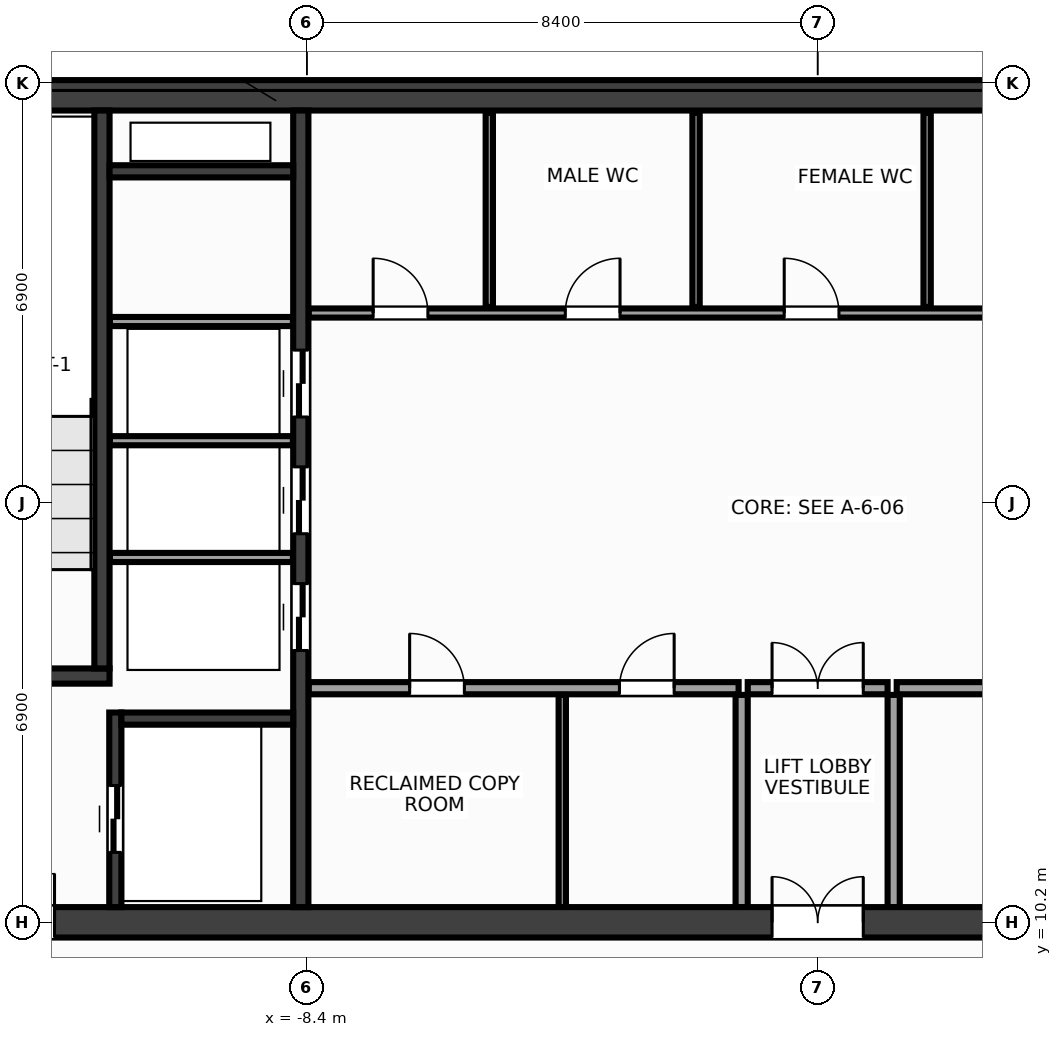
"""IFC4 building model, lengths in metres.
Left out: names, types, materials, properties, quantities, classifications, styles, units other than length and angle.
Written with IfcOpenShell. Run it as: python <this file> out.ifc"""

import sys

from ifc_helpers import new_model, si_unit, direction, frame, frame_2d, origin, place, context, subcontext, project, spatial, rectangle, extrude, source, transform, mapped, element, fill, save


model = new_model("IFC4")
c1 = context("Model", 3, precision=1e-05, world=origin(), true_north=direction((0.0, 1.0)))
c2 = subcontext(c1, "Body", "Model", "MODEL_VIEW")
j1 = project(units=[si_unit("LENGTHUNIT", "METRE"), si_unit("PLANEANGLEUNIT", "RADIAN")], contexts=[c1])
p1 = place(None, origin())
s1 = spatial("IfcSite", under=j1, at=p1, CompositionType="ELEMENT")
p2 = place(p1, origin())
s2 = spatial("IfcBuilding", under=s1, at=p2, CompositionType="ELEMENT")
p3 = place(p2, frame((0.0, 0.0, 207.2)))
s3 = spatial("IfcBuildingStorey", under=s2, at=p3, CompositionType="ELEMENT", Elevation=207.2)
m1 = source(origin(), c2, "Body", "SweptSolid", [
    extrude(rectangle(XDim=31.7, YDim=0.5, at=frame_2d((15.85, 0.0))), origin(), (0.0, 0.0, 1.0), 3.6),
])
p4 = place(p3, frame((-15.85, 23.8, 0.0), z_axis=(0.0, 0.0, 1.0), x_axis=(1.0, 0.0, 0.0)))
e1 = element("IfcWall", 1, at=p4, inside=s3, PredefinedType="SHEAR", context=c2, shape_type="MappedRepresentation", body=[
    mapped(m1, transform((0.0, 0.0, 0.0), x_axis=(1.0, 0.0, 0.0), y_axis=(0.0, 1.0, 0.0), z_axis=(0.0, 0.0, 1.0), scale=1.0)),
])
p5 = place(p3, frame((-15.85, 10.2, 0.0), z_axis=(0.0, 0.0, 1.0), x_axis=(1.0, 0.0, 0.0)))
e2 = element("IfcWall", 2, at=p5, inside=s3, PredefinedType="SHEAR", context=c2, shape_type="MappedRepresentation", body=[
    mapped(m1, transform((0.0, 0.0, 0.0), x_axis=(1.0, 0.0, 0.0), y_axis=(0.0, 1.0, 0.0), z_axis=(0.0, 0.0, 1.0), scale=1.0)),
])
p6 = place(p5, frame((1.7, 0.0, 0.0)))
e3 = element("IfcOpeningElement", 3, at=p6, cuts=e2, PredefinedType="OPENING", context=c2, shape_type="SweptSolid", body=[
    extrude(rectangle(XDim=1.6, YDim=2.15, at=frame_2d((0.8, 1.075))), frame((0.0, 0.262, 0.0), z_axis=(0.0, -1.0, 0.0), x_axis=(1.0, 0.0, 0.0)), (0.0, 0.0, 1.0), 0.524),
])
p7 = place(p5, frame((28.4, 0.0, 0.0)))
e4 = element("IfcOpeningElement", 4, at=p7, cuts=e2, PredefinedType="OPENING", context=c2, shape_type="SweptSolid", body=[
    extrude(rectangle(XDim=1.6, YDim=2.15, at=frame_2d((0.8, 1.075))), frame((0.0, 0.262, 0.0), z_axis=(0.0, -1.0, 0.0), x_axis=(1.0, 0.0, 0.0)), (0.0, 0.0, 1.0), 0.524),
])
p8 = place(p5, frame((15.1, 0.0, 0.0)))
e5 = element("IfcOpeningElement", 5, at=p8, cuts=e2, PredefinedType="OPENING", context=c2, shape_type="SweptSolid", body=[
    extrude(rectangle(XDim=1.5, YDim=2.2, at=frame_2d((0.75, 1.1))), frame((0.0, 0.262, 0.0), z_axis=(0.0, -1.0, 0.0), x_axis=(1.0, 0.0, 0.0)), (0.0, 0.0, 1.0), 0.524),
])
m2 = source(origin(), c2, "Body", "SweptSolid", [
    extrude(rectangle(XDim=13.1, YDim=0.25, at=frame_2d((6.55, 0.0))), origin(), (0.0, 0.0, 1.0), 3.6),
])
p9 = place(p3, frame((-8.5, 10.45, 0.0), z_axis=(0.0, 0.0, 1.0), x_axis=(0.0, 1.0, 0.0)))
e6 = element("IfcWall", 6, at=p9, inside=s3, PredefinedType="SHEAR", context=c2, shape_type="MappedRepresentation", body=[
    mapped(m2, transform((0.0, 0.0, 0.0), x_axis=(1.0, 0.0, 0.0), y_axis=(0.0, 1.0, 0.0), z_axis=(0.0, 0.0, 1.0), scale=1.0)),
])
p10 = place(p9, frame((4.22, 0.0, 0.0)))
e7 = element("IfcOpeningElement", 7, at=p10, cuts=e6, PredefinedType="OPENING", context=c2, shape_type="SweptSolid", body=[
    extrude(rectangle(XDim=1.1, YDim=2.15, at=frame_2d((0.55, 1.075))), frame((0.0, 0.137, 0.0), z_axis=(0.0, -1.0, 0.0), x_axis=(1.0, 0.0, 0.0)), (0.0, 0.0, 1.0), 0.274),
])
p11 = place(p9, frame((6.14, 0.0, 0.0)))
e8 = element("IfcOpeningElement", 8, at=p11, cuts=e6, PredefinedType="OPENING", context=c2, shape_type="SweptSolid", body=[
    extrude(rectangle(XDim=1.1, YDim=2.15, at=frame_2d((0.55, 1.075))), frame((0.0, 0.137, 0.0), z_axis=(0.0, -1.0, 0.0), x_axis=(1.0, 0.0, 0.0)), (0.0, 0.0, 1.0), 0.274),
])
p12 = place(p9, frame((8.06, 0.0, 0.0)))
e9 = element("IfcOpeningElement", 9, at=p12, cuts=e6, PredefinedType="OPENING", context=c2, shape_type="SweptSolid", body=[
    extrude(rectangle(XDim=1.1, YDim=2.15, at=frame_2d((0.55, 1.075))), frame((0.0, 0.137, 0.0), z_axis=(0.0, -1.0, 0.0), x_axis=(1.0, 0.0, 0.0)), (0.0, 0.0, 1.0), 0.274),
])
m3 = source(origin(), c2, "Body", "SweptSolid", [
    extrude(rectangle(XDim=3.705, YDim=0.25, at=frame_2d((1.853, 0.0))), origin(), (0.0, 0.0, 1.0), 3.6),
])
p13 = place(p3, frame((-15.35, 14.25, 0.0), z_axis=(0.0, 0.0, 1.0), x_axis=(1.0, 0.0, 0.0)))
e10 = element("IfcWall", 10, at=p13, inside=s3, PredefinedType="SHEAR", context=c2, shape_type="MappedRepresentation", body=[
    mapped(m3, transform((0.0, 0.0, 0.0), x_axis=(1.0, 0.0, 0.0), y_axis=(0.0, 1.0, 0.0), z_axis=(0.0, 0.0, 1.0), scale=1.0)),
])
p14 = place(p13, frame((0.95, 0.0, 0.0)))
e11 = element("IfcOpeningElement", 11, at=p14, cuts=e10, PredefinedType="OPENING", context=c2, shape_type="SweptSolid", body=[
    extrude(rectangle(XDim=1.6, YDim=2.15, at=frame_2d((0.8, 1.075))), frame((0.0, 0.137, 0.0), z_axis=(0.0, -1.0, 0.0), x_axis=(1.0, 0.0, 0.0)), (0.0, 0.0, 1.0), 0.274),
])
m4 = source(origin(), c2, "Body", "SweptSolid", [
    extrude(rectangle(XDim=9.175, YDim=0.25, at=frame_2d((4.587, 0.0))), origin(), (0.0, 0.0, 1.0), 3.6),
])
p15 = place(p3, frame((-11.77, 14.375, 0.0), z_axis=(0.0, 0.0, 1.0), x_axis=(0.0, 1.0, 0.0)))
e12 = element("IfcWall", 12, at=p15, inside=s3, PredefinedType="SHEAR", context=c2, shape_type="MappedRepresentation", body=[
    mapped(m4, transform((0.0, 0.0, 0.0), x_axis=(1.0, 0.0, 0.0), y_axis=(0.0, 1.0, 0.0), z_axis=(0.0, 0.0, 1.0), scale=1.0)),
])
m5 = source(origin(), c2, "Body", "SweptSolid", [
    extrude(rectangle(XDim=3.2, YDim=0.2, at=frame_2d((1.6, 0.0))), origin(), (0.0, 0.0, 1.0), 3.6),
])
p16 = place(p3, frame((-11.55, 10.45, 0.0), z_axis=(0.0, 0.0, 1.0), x_axis=(0.0, 1.0, 0.0)))
e13 = element("IfcWall", 13, at=p16, inside=s3, PredefinedType="SHEAR", context=c2, shape_type="MappedRepresentation", body=[
    mapped(m5, transform((0.0, 0.0, 0.0), x_axis=(1.0, 0.0, 0.0), y_axis=(0.0, 1.0, 0.0), z_axis=(0.0, 0.0, 1.0), scale=1.0)),
])
p17 = place(p16, frame((0.9, 0.0, 0.0)))
e14 = element("IfcOpeningElement", 14, at=p17, cuts=e13, PredefinedType="OPENING", context=c2, shape_type="SweptSolid", body=[
    extrude(rectangle(XDim=1.1, YDim=2.15, at=frame_2d((0.55, 1.075))), frame((0.0, 0.112, 0.0), z_axis=(0.0, -1.0, 0.0), x_axis=(1.0, 0.0, 0.0)), (0.0, 0.0, 1.0), 0.224),
])
m6 = source(origin(), c2, "Body", "SweptSolid", [
    extrude(rectangle(XDim=2.825, YDim=0.2, at=frame_2d((1.413, 0.0))), origin(), (0.0, 0.0, 1.0), 3.6),
])
p18 = place(p3, frame((-11.45, 13.55, 0.0), z_axis=(0.0, 0.0, 1.0), x_axis=(1.0, 0.0, 0.0)))
e15 = element("IfcWall", 15, at=p18, inside=s3, PredefinedType="SHEAR", context=c2, shape_type="MappedRepresentation", body=[
    mapped(m6, transform((0.0, 0.0, 0.0), x_axis=(1.0, 0.0, 0.0), y_axis=(0.0, 1.0, 0.0), z_axis=(0.0, 0.0, 1.0), scale=1.0)),
])
m7 = source(origin(), c2, "Body", "SweptSolid", [
    extrude(rectangle(XDim=3.02, YDim=0.2, at=frame_2d((1.51, 0.0))), origin(), (0.0, 0.0, 1.0), 3.6),
])
p19 = place(p3, frame((-11.645, 22.55, 0.0), z_axis=(0.0, 0.0, 1.0), x_axis=(1.0, 0.0, 0.0)))
e16 = element("IfcWall", 16, at=p19, inside=s3, PredefinedType="SHEAR", context=c2, shape_type="MappedRepresentation", body=[
    mapped(m7, transform((0.0, 0.0, 0.0), x_axis=(1.0, 0.0, 0.0), y_axis=(0.0, 1.0, 0.0), z_axis=(0.0, 0.0, 1.0), scale=1.0)),
])
m8 = source(origin(), c2, "Body", "SweptSolid", [
    extrude(rectangle(XDim=3.01, YDim=0.15, at=frame_2d((1.505, 0.0))), origin(), (0.0, 0.0, 1.0), 3.38),
])
for number, where, z_axis, x_axis in (
    (17, (-11.64, 16.2, 0.0), (0.0, 0.0, 1.0), (1.0, 0.0, 0.0)),
    (18, (-11.64, 18.12, 0.0), (0.0, 0.0, 1.0), (1.0, 0.0, 0.0)),
    (19, (-11.64, 20.08, 0.0), (0.0, 0.0, 1.0), (1.0, 0.0, 0.0)),
):
    element("IfcWall", number, at=place(p3, frame(where, z_axis=z_axis, x_axis=x_axis)), inside=s3, PredefinedType="PARTITIONING", context=c2, shape_type="MappedRepresentation", body=[
        mapped(m8, transform((0.0, 0.0, 0.0), x_axis=(1.0, 0.0, 0.0), y_axis=(0.0, 1.0, 0.0), z_axis=(0.0, 0.0, 1.0), scale=1.0)),
    ])
m9 = source(origin(), c2, "Body", "SweptSolid", [
    extrude(rectangle(XDim=7.07, YDim=0.2, at=frame_2d((3.535, 0.0))), origin(), (0.0, 0.0, 1.0), 3.38),
])
p20 = place(p3, frame((-8.37, 14.05, 0.0), z_axis=(0.0, 0.0, 1.0), x_axis=(1.0, 0.0, 0.0)))
e20 = element("IfcWall", 20, at=p20, inside=s3, PredefinedType="PARTITIONING", context=c2, shape_type="MappedRepresentation", body=[
    mapped(m9, transform((0.0, 0.0, 0.0), x_axis=(1.0, 0.0, 0.0), y_axis=(0.0, 1.0, 0.0), z_axis=(0.0, 0.0, 1.0), scale=1.0)),
])
p21 = place(p20, frame((1.66, 0.0, 0.0)))
e21 = element("IfcOpeningElement", 21, at=p21, cuts=e20, PredefinedType="OPENING", context=c2, shape_type="SweptSolid", body=[
    extrude(rectangle(XDim=0.9, YDim=2.15, at=frame_2d((0.45, 1.075))), frame((0.0, 0.112, 0.0), z_axis=(0.0, -1.0, 0.0), x_axis=(1.0, 0.0, 0.0)), (0.0, 0.0, 1.0), 0.224),
])
p22 = place(p20, frame((5.11, 0.0, 0.0)))
e22 = element("IfcOpeningElement", 22, at=p22, cuts=e20, PredefinedType="OPENING", context=c2, shape_type="SweptSolid", body=[
    extrude(rectangle(XDim=0.9, YDim=2.15, at=frame_2d((0.45, 1.075))), frame((0.0, 0.112, 0.0), z_axis=(0.0, -1.0, 0.0), x_axis=(1.0, 0.0, 0.0)), (0.0, 0.0, 1.0), 0.224),
])
p23 = place(p3, frame((1.3, 14.05, 0.0), z_axis=(0.0, 0.0, 1.0), x_axis=(1.0, 0.0, 0.0)))
e23 = element("IfcWall", 23, at=p23, inside=s3, PredefinedType="PARTITIONING", context=c2, shape_type="MappedRepresentation", body=[
    mapped(m9, transform((0.0, 0.0, 0.0), x_axis=(1.0, 0.0, 0.0), y_axis=(0.0, 1.0, 0.0), z_axis=(0.0, 0.0, 1.0), scale=1.0)),
])
p24 = place(p23, frame((2.8, 0.0, 0.0)))
e24 = element("IfcOpeningElement", 24, at=p24, cuts=e23, PredefinedType="OPENING", context=c2, shape_type="SweptSolid", body=[
    extrude(rectangle(XDim=0.98, YDim=2.15, at=frame_2d((0.49, 1.075))), frame((0.0, 0.112, 0.0), z_axis=(0.0, -1.0, 0.0), x_axis=(1.0, 0.0, 0.0)), (0.0, 0.0, 1.0), 0.224),
])
m10 = source(origin(), c2, "Body", "SweptSolid", [
    extrude(rectangle(XDim=3.49, YDim=0.2, at=frame_2d((1.745, 0.0))), origin(), (0.0, 0.0, 1.0), 3.38),
])
for number, where, z_axis, x_axis in (
    (25, (-1.25, 10.45, 0.0), (0.0, 0.0, 1.0), (0.0, 1.0, 0.0)),
    (26, (1.25, 10.45, 0.0), (0.0, 0.0, 1.0), (0.0, 1.0, 0.0)),
):
    element("IfcWall", number, at=place(p3, frame(where, z_axis=z_axis, x_axis=x_axis)), inside=s3, PredefinedType="PARTITIONING", context=c2, shape_type="MappedRepresentation", body=[
        mapped(m10, transform((0.0, 0.0, 0.0), x_axis=(1.0, 0.0, 0.0), y_axis=(0.0, 1.0, 0.0), z_axis=(0.0, 0.0, 1.0), scale=1.0)),
    ])
m11 = source(origin(), c2, "Body", "SweptSolid", [
    extrude(rectangle(XDim=2.3, YDim=0.2, at=frame_2d((1.15, 0.0))), origin(), (0.0, 0.0, 1.0), 3.38),
])
p25 = place(p3, frame((-1.15, 14.05, 0.0), z_axis=(0.0, 0.0, 1.0), x_axis=(1.0, 0.0, 0.0)))
e27 = element("IfcWall", 27, at=p25, inside=s3, PredefinedType="PARTITIONING", context=c2, shape_type="MappedRepresentation", body=[
    mapped(m11, transform((0.0, 0.0, 0.0), x_axis=(1.0, 0.0, 0.0), y_axis=(0.0, 1.0, 0.0), z_axis=(0.0, 0.0, 1.0), scale=1.0)),
])
p26 = place(p25, frame((0.4, 0.0, 0.0)))
e28 = element("IfcOpeningElement", 28, at=p26, cuts=e27, PredefinedType="OPENING", context=c2, shape_type="SweptSolid", body=[
    extrude(rectangle(XDim=1.5, YDim=2.2, at=frame_2d((0.75, 1.1))), frame((0.0, 0.112, 0.0), z_axis=(0.0, -1.0, 0.0), x_axis=(1.0, 0.0, 0.0)), (0.0, 0.0, 1.0), 0.224),
])
m12 = source(origin(), c2, "Body", "SweptSolid", [
    extrude(rectangle(XDim=14.59, YDim=0.15, at=frame_2d((7.295, 0.0))), origin(), (0.0, 0.0, 1.0), 3.38),
])
p27 = place(p3, frame((-8.37, 20.22, 0.0), z_axis=(0.0, 0.0, 1.0), x_axis=(1.0, 0.0, 0.0)))
e29 = element("IfcWall", 29, at=p27, inside=s3, PredefinedType="PARTITIONING", context=c2, shape_type="MappedRepresentation", body=[
    mapped(m12, transform((0.0, 0.0, 0.0), x_axis=(1.0, 0.0, 0.0), y_axis=(0.0, 1.0, 0.0), z_axis=(0.0, 0.0, 1.0), scale=1.0)),
])
p28 = place(p27, frame((1.06, 0.0, 0.0)))
e30 = element("IfcOpeningElement", 30, at=p28, cuts=e29, PredefinedType="OPENING", context=c2, shape_type="SweptSolid", body=[
    extrude(rectangle(XDim=0.9, YDim=2.15, at=frame_2d((0.45, 1.075))), frame((0.0, 0.087, 0.0), z_axis=(0.0, -1.0, 0.0), x_axis=(1.0, 0.0, 0.0)), (0.0, 0.0, 1.0), 0.174),
])
p29 = place(p27, frame((4.22, 0.0, 0.0)))
e31 = element("IfcOpeningElement", 31, at=p29, cuts=e29, PredefinedType="OPENING", context=c2, shape_type="SweptSolid", body=[
    extrude(rectangle(XDim=0.9, YDim=2.15, at=frame_2d((0.45, 1.075))), frame((0.0, 0.087, 0.0), z_axis=(0.0, -1.0, 0.0), x_axis=(1.0, 0.0, 0.0)), (0.0, 0.0, 1.0), 0.174),
])
p30 = place(p27, frame((7.82, 0.0, 0.0)))
e32 = element("IfcOpeningElement", 32, at=p30, cuts=e29, PredefinedType="OPENING", context=c2, shape_type="SweptSolid", body=[
    extrude(rectangle(XDim=0.9, YDim=2.15, at=frame_2d((0.45, 1.075))), frame((0.0, 0.087, 0.0), z_axis=(0.0, -1.0, 0.0), x_axis=(1.0, 0.0, 0.0)), (0.0, 0.0, 1.0), 0.174),
])
p31 = place(p27, frame((11.87, 0.0, 0.0)))
e33 = element("IfcOpeningElement", 33, at=p31, cuts=e29, PredefinedType="OPENING", context=c2, shape_type="SweptSolid", body=[
    extrude(rectangle(XDim=0.9, YDim=2.15, at=frame_2d((0.45, 1.075))), frame((0.0, 0.087, 0.0), z_axis=(0.0, -1.0, 0.0), x_axis=(1.0, 0.0, 0.0)), (0.0, 0.0, 1.0), 0.174),
])
m13 = source(origin(), c2, "Body", "SweptSolid", [
    extrude(rectangle(XDim=3.49, YDim=0.12, at=frame_2d((1.745, 0.0))), origin(), (0.0, 0.0, 1.0), 3.38),
])
p32 = place(p3, frame((-4.2, 10.45, 0.0), z_axis=(0.0, 0.0, 1.0), x_axis=(0.0, 1.0, 0.0)))
e34 = element("IfcWall", 34, at=p32, inside=s3, PredefinedType="PARTITIONING", context=c2, shape_type="MappedRepresentation", body=[
    mapped(m13, transform((0.0, 0.0, 0.0), x_axis=(1.0, 0.0, 0.0), y_axis=(0.0, 1.0, 0.0), z_axis=(0.0, 0.0, 1.0), scale=1.0)),
])
m14 = source(origin(), c2, "Body", "SweptSolid", [
    extrude(rectangle(XDim=3.19, YDim=0.12, at=frame_2d((1.595, 0.0))), origin(), (0.0, 0.0, 1.0), 3.38),
])
for number, where, z_axis, x_axis in (
    (35, (-5.4, 20.32, 0.0), (0.0, 0.0, 1.0), (0.0, 1.0, 0.0)),
    (36, (-2.0, 20.32, 0.0), (0.0, 0.0, 1.0), (0.0, 1.0, 0.0)),
    (37, (1.8, 20.32, 0.0), (0.0, 0.0, 1.0), (0.0, 1.0, 0.0)),
):
    element("IfcWall", number, at=place(p3, frame(where, z_axis=z_axis, x_axis=x_axis)), inside=s3, PredefinedType="PARTITIONING", context=c2, shape_type="MappedRepresentation", body=[
        mapped(m14, transform((0.0, 0.0, 0.0), x_axis=(1.0, 0.0, 0.0), y_axis=(0.0, 1.0, 0.0), z_axis=(0.0, 0.0, 1.0), scale=1.0)),
    ])
m15 = source(origin(), c2, "Body", "SweptSolid", [
    extrude(rectangle(XDim=1.6, YDim=2.15, at=frame_2d((0.8, 1.075))), frame((0.0, 0.025, 0.0), z_axis=(0.0, -1.0, 0.0), x_axis=(1.0, 0.0, 0.0)), (0.0, 0.0, 1.0), 0.05),
])
p33 = place(p6, origin())
e38 = element("IfcDoor", 38, at=p33, inside=s3, OperationType="DOUBLE_DOOR_SINGLE_SWING", PredefinedType="DOOR", context=c2, shape_type="MappedRepresentation", body=[
    mapped(m15, transform((0.0, 0.0, 0.0), x_axis=(1.0, 0.0, 0.0), y_axis=(0.0, 1.0, 0.0), z_axis=(0.0, 0.0, 1.0), scale=1.0)),
])
fill(e3, e38)
m16 = source(origin(), c2, "Body", "SweptSolid", [
    extrude(rectangle(XDim=1.1, YDim=2.15, at=frame_2d((0.55, 1.075))), frame((0.0, 0.025, 0.0), z_axis=(0.0, -1.0, 0.0), x_axis=(1.0, 0.0, 0.0)), (0.0, 0.0, 1.0), 0.05),
])
p34 = place(p17, origin())
e39 = element("IfcDoor", 39, at=p34, inside=s3, OperationType="DOUBLE_DOOR_SLIDING", PredefinedType="DOOR", context=c2, shape_type="MappedRepresentation", body=[
    mapped(m16, transform((0.0, 0.0, 0.0), x_axis=(1.0, 0.0, 0.0), y_axis=(0.0, 1.0, 0.0), z_axis=(0.0, 0.0, 1.0), scale=1.0)),
])
fill(e14, e39)
p35 = place(p10, origin())
e40 = element("IfcDoor", 40, at=p35, inside=s3, OperationType="DOUBLE_DOOR_SLIDING", PredefinedType="DOOR", context=c2, shape_type="MappedRepresentation", body=[
    mapped(m16, transform((0.0, 0.0, 0.0), x_axis=(1.0, 0.0, 0.0), y_axis=(0.0, 1.0, 0.0), z_axis=(0.0, 0.0, 1.0), scale=1.0)),
])
fill(e7, e40)
p36 = place(p11, origin())
e41 = element("IfcDoor", 41, at=p36, inside=s3, OperationType="DOUBLE_DOOR_SLIDING", PredefinedType="DOOR", context=c2, shape_type="MappedRepresentation", body=[
    mapped(m16, transform((0.0, 0.0, 0.0), x_axis=(1.0, 0.0, 0.0), y_axis=(0.0, 1.0, 0.0), z_axis=(0.0, 0.0, 1.0), scale=1.0)),
])
fill(e8, e41)
p37 = place(p12, origin())
e42 = element("IfcDoor", 42, at=p37, inside=s3, OperationType="DOUBLE_DOOR_SLIDING", PredefinedType="DOOR", context=c2, shape_type="MappedRepresentation", body=[
    mapped(m16, transform((0.0, 0.0, 0.0), x_axis=(1.0, 0.0, 0.0), y_axis=(0.0, 1.0, 0.0), z_axis=(0.0, 0.0, 1.0), scale=1.0)),
])
fill(e9, e42)
m17 = source(origin(), c2, "Body", "SweptSolid", [
    extrude(rectangle(XDim=0.9, YDim=2.15, at=frame_2d((0.45, 1.075))), frame((0.0, 0.025, 0.0), z_axis=(0.0, -1.0, 0.0), x_axis=(1.0, 0.0, 0.0)), (0.0, 0.0, 1.0), 0.05),
])
p38 = place(p21, origin())
e43 = element("IfcDoor", 43, at=p38, inside=s3, OperationType="SINGLE_SWING_LEFT", PredefinedType="DOOR", context=c2, shape_type="MappedRepresentation", body=[
    mapped(m17, transform((0.0, 0.0, 0.0), x_axis=(1.0, 0.0, 0.0), y_axis=(0.0, 1.0, 0.0), z_axis=(0.0, 0.0, 1.0), scale=1.0)),
])
fill(e21, e43)
p39 = place(p22, origin())
e44 = element("IfcDoor", 44, at=p39, inside=s3, OperationType="SINGLE_SWING_RIGHT", PredefinedType="DOOR", context=c2, shape_type="MappedRepresentation", body=[
    mapped(m17, transform((0.0, 0.0, 0.0), x_axis=(1.0, 0.0, 0.0), y_axis=(0.0, 1.0, 0.0), z_axis=(0.0, 0.0, 1.0), scale=1.0)),
])
fill(e22, e44)
m18 = source(origin(), c2, "Body", "SweptSolid", [
    extrude(rectangle(XDim=1.5, YDim=2.2, at=frame_2d((0.75, 1.1))), frame((0.0, 0.025, 0.0), z_axis=(0.0, -1.0, 0.0), x_axis=(1.0, 0.0, 0.0)), (0.0, 0.0, 1.0), 0.05),
])
p40 = place(p26, origin())
e45 = element("IfcDoor", 45, at=p40, inside=s3, OperationType="DOUBLE_DOOR_SINGLE_SWING", PredefinedType="DOOR", context=c2, shape_type="MappedRepresentation", body=[
    mapped(m18, transform((0.0, 0.0, 0.0), x_axis=(1.0, 0.0, 0.0), y_axis=(0.0, 1.0, 0.0), z_axis=(0.0, 0.0, 1.0), scale=1.0)),
])
fill(e28, e45)
p41 = place(p8, origin())
e46 = element("IfcDoor", 46, at=p41, inside=s3, OperationType="DOUBLE_DOOR_SINGLE_SWING", PredefinedType="DOOR", context=c2, shape_type="MappedRepresentation", body=[
    mapped(m18, transform((0.0, 0.0, 0.0), x_axis=(1.0, 0.0, 0.0), y_axis=(0.0, 1.0, 0.0), z_axis=(0.0, 0.0, 1.0), scale=1.0)),
])
fill(e5, e46)
p42 = place(p28, origin())
e47 = element("IfcDoor", 47, at=p42, inside=s3, OperationType="SINGLE_SWING_LEFT", PredefinedType="DOOR", context=c2, shape_type="MappedRepresentation", body=[
    mapped(m17, transform((0.0, 0.0, 0.0), x_axis=(1.0, 0.0, 0.0), y_axis=(0.0, 1.0, 0.0), z_axis=(0.0, 0.0, 1.0), scale=1.0)),
])
fill(e30, e47)
p43 = place(p29, origin())
e48 = element("IfcDoor", 48, at=p43, inside=s3, OperationType="SINGLE_SWING_RIGHT", PredefinedType="DOOR", context=c2, shape_type="MappedRepresentation", body=[
    mapped(m17, transform((0.0, 0.0, 0.0), x_axis=(1.0, 0.0, 0.0), y_axis=(0.0, 1.0, 0.0), z_axis=(0.0, 0.0, 1.0), scale=1.0)),
])
fill(e31, e48)
p44 = place(p30, origin())
e49 = element("IfcDoor", 49, at=p44, inside=s3, OperationType="SINGLE_SWING_LEFT", PredefinedType="DOOR", context=c2, shape_type="MappedRepresentation", body=[
    mapped(m17, transform((0.0, 0.0, 0.0), x_axis=(1.0, 0.0, 0.0), y_axis=(0.0, 1.0, 0.0), z_axis=(0.0, 0.0, 1.0), scale=1.0)),
])
fill(e32, e49)
save(model, sys.argv[1])
